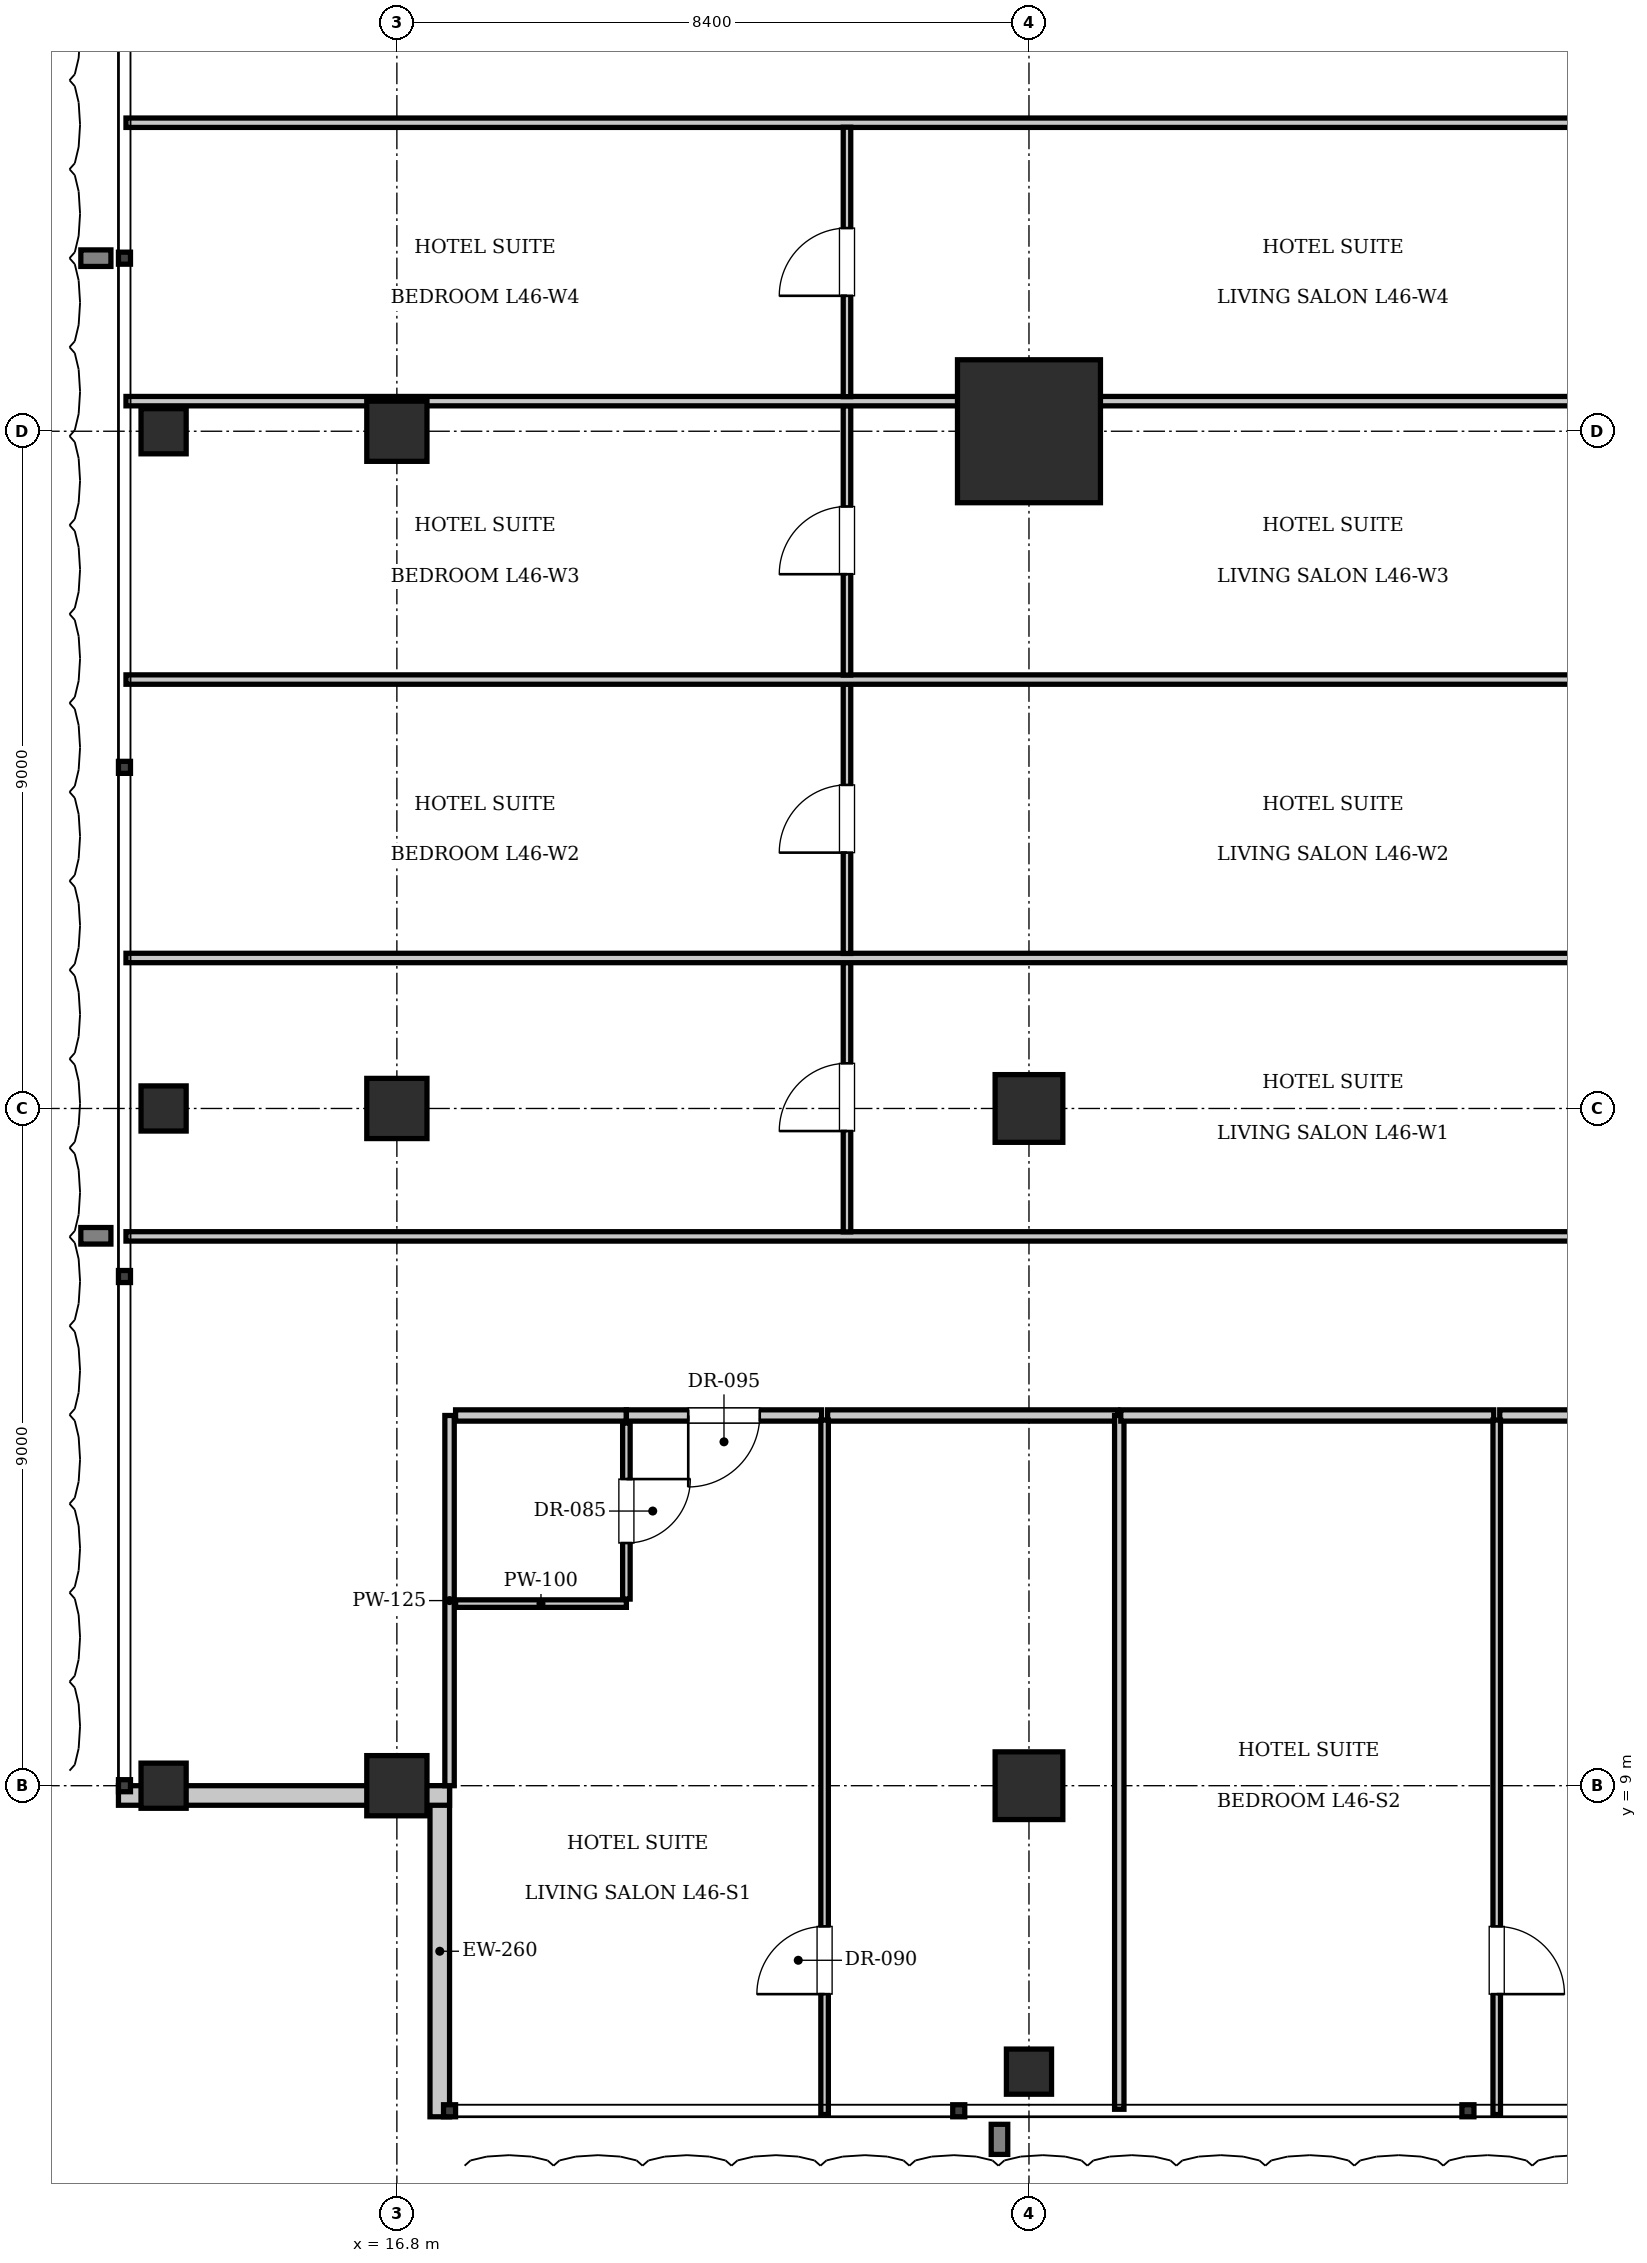
"""IFC4 building model, lengths in metres.
Left out: names, types, materials, properties, quantities, classifications, styles, units other than length and angle.
Written with IfcOpenShell. Run it as: python <this file> out.ifc"""

import sys

from ifc_helpers import new_model, si_unit, direction, frame, frame_2d, origin, origin_2d, place, context, subcontext, project, spatial, rectangle, i_section, extrude, element, fill, save


model = new_model("IFC4")
c1 = context("Model", 3, precision=1e-05, world=origin(), true_north=direction((0.0, 1.0)))
c2 = subcontext(c1, "Body", "Model", "MODEL_VIEW")
j1 = project(units=[si_unit("LENGTHUNIT", "METRE"), si_unit("PLANEANGLEUNIT", "RADIAN")], contexts=[c1])
p1 = place(None, origin())
s1 = spatial("IfcSite", under=j1, at=p1, CompositionType="ELEMENT")
p2 = place(p1, origin())
s2 = spatial("IfcBuilding", under=s1, at=p2, CompositionType="ELEMENT")
p3 = place(p2, frame((0.0, 0.0, 189.0)))
s3 = spatial("IfcBuildingStorey", under=s2, at=p3, CompositionType="ELEMENT", Elevation=189.0)
p4 = place(p3, frame((25.2, 27.0, 0.0), z_axis=(0.0, 0.0, 1.0), x_axis=(1.0, 0.0, 0.0)))
e1 = element("IfcColumn", 1, at=p4, inside=s3, PredefinedType="COLUMN", context=c2, shape_type="SweptSolid", body=[
    extrude(rectangle(XDim=1.9, YDim=1.9, at=origin_2d()), origin(), (0.0, 0.0, 1.0), 3.85),
])
for number, where, z_axis, x_axis in (
    (2, (25.2, 18.0, 0.0), (0.0, 0.0, 1.0), (1.0, 0.0, 0.0)),
    (3, (25.2, 9.0, 0.0), (0.0, 0.0, 1.0), (1.0, 0.0, 0.0)),
):
    element("IfcColumn", number, at=place(p3, frame(where, z_axis=z_axis, x_axis=x_axis)), inside=s3, PredefinedType="COLUMN", context=c2, shape_type="SweptSolid", body=[
        extrude(rectangle(XDim=0.9, YDim=0.9, at=origin_2d()), origin(), (0.0, 0.0, 1.0), 3.85),
    ])
for number, where, z_axis, x_axis in (
    (4, (16.8, 9.0, 0.0), (0.0, 0.0, 1.0), (1.0, 0.0, 0.0)),
    (5, (16.8, 18.0, 0.0), (0.0, 0.0, 1.0), (1.0, 0.0, 0.0)),
    (6, (16.8, 27.0, 0.0), (0.0, 0.0, 1.0), (1.0, 0.0, 0.0)),
):
    element("IfcColumn", number, at=place(p3, frame(where, z_axis=z_axis, x_axis=x_axis)), inside=s3, PredefinedType="COLUMN", context=c2, shape_type="SweptSolid", body=[
        extrude(rectangle(XDim=0.8, YDim=0.8, at=origin_2d()), origin(), (0.0, 0.0, 1.0), 3.85),
    ])
for number, where, z_axis, x_axis in (
    (7, (13.7, 9.0, 0.0), (0.0, 0.0, 1.0), (1.0, 0.0, 0.0)),
    (8, (13.7, 18.0, 0.0), (0.0, 0.0, 1.0), (1.0, 0.0, 0.0)),
    (9, (13.7, 27.0, 0.0), (0.0, 0.0, 1.0), (1.0, 0.0, 0.0)),
    (10, (25.2, 5.2, 0.0), (0.0, 0.0, 1.0), (1.0, 0.0, 0.0)),
):
    element("IfcColumn", number, at=place(p3, frame(where, z_axis=z_axis, x_axis=x_axis)), inside=s3, PredefinedType="COLUMN", context=c2, shape_type="SweptSolid", body=[
        extrude(i_section(OverallWidth=0.6, OverallDepth=0.6, WebThickness=0.025, FlangeThickness=0.038, at=origin_2d()), origin(), (0.0, 0.0, 1.0), 3.85),
    ])
p5 = place(p3, frame((17.37, 4.6, 0.0), z_axis=(0.0, 0.0, 1.0), x_axis=(0.0, 1.0, 0.0)))
e11 = element("IfcWall", 11, at=p5, inside=s3, PredefinedType="SOLIDWALL", context=c2, shape_type="SweptSolid", body=[
    extrude(rectangle(XDim=4.4, YDim=0.26, at=frame_2d((2.2, 0.0))), origin(), (0.0, 0.0, 1.0), 3.61),
])
p6 = place(p3, frame((17.5, 8.87, 0.0), z_axis=(0.0, 0.0, 1.0), x_axis=(-1.0, 0.0, 0.0)))
e12 = element("IfcWall", 12, at=p6, inside=s3, PredefinedType="SOLIDWALL", context=c2, shape_type="SweptSolid", body=[
    extrude(rectangle(XDim=4.4, YDim=0.26, at=frame_2d((2.2, 0.0))), origin(), (0.0, 0.0, 1.0), 3.007),
])
p7 = place(p3, frame((17.5, 9.0, 0.0), z_axis=(0.0, 0.0, 1.0), x_axis=(0.0, 1.0, 0.0)))
e13 = element("IfcWall", 13, at=p7, inside=s3, PredefinedType="PARTITIONING", context=c2, shape_type="SweptSolid", body=[
    extrude(rectangle(XDim=4.92, YDim=0.125, at=frame_2d((2.46, 0.0))), origin(), (0.0, 0.0, 1.0), 3.61),
])
p8 = place(p3, frame((17.58, 13.92, 0.0), z_axis=(0.0, 0.0, 1.0), x_axis=(1.0, 0.0, 0.0)))
e14 = element("IfcWall", 14, at=p8, inside=s3, PredefinedType="PARTITIONING", context=c2, shape_type="SweptSolid", body=[
    extrude(rectangle(XDim=2.27, YDim=0.15, at=frame_2d((1.135, 0.0))), origin(), (0.0, 0.0, 1.0), 3.61),
])
p9 = place(p3, frame((17.58, 11.42, 0.0), z_axis=(0.0, 0.0, 1.0), x_axis=(1.0, 0.0, 0.0)))
e15 = element("IfcWall", 15, at=p9, inside=s3, PredefinedType="PARTITIONING", context=c2, shape_type="SweptSolid", body=[
    extrude(rectangle(XDim=2.27, YDim=0.1, at=frame_2d((1.135, 0.0))), origin(), (0.0, 0.0, 1.0), 3.61),
])
p10 = place(p3, frame((19.85, 11.48, 0.0), z_axis=(0.0, 0.0, 1.0), x_axis=(0.0, 1.0, 0.0)))
e16 = element("IfcWall", 16, at=p10, inside=s3, PredefinedType="PARTITIONING", context=c2, shape_type="SweptSolid", body=[
    extrude(rectangle(XDim=2.34, YDim=0.1, at=frame_2d((1.17, 0.0))), origin(), (0.0, 0.0, 1.0), 3.61),
])
p11 = place(p10, frame((0.745, 0.0, 0.0)))
e17 = element("IfcOpeningElement", 17, at=p11, cuts=e16, PredefinedType="OPENING", context=c2, shape_type="SweptSolid", body=[
    extrude(rectangle(XDim=0.85, YDim=2.1, at=frame_2d((0.425, 1.05))), frame((0.0, 0.06, 0.0), z_axis=(0.0, -1.0, 0.0), x_axis=(1.0, 0.0, 0.0)), (0.0, 0.0, 1.0), 0.12),
])
p12 = place(p3, frame((19.85, 13.92, 0.0), z_axis=(0.0, 0.0, 1.0), x_axis=(1.0, 0.0, 0.0)))
e18 = element("IfcWall", 18, at=p12, inside=s3, PredefinedType="PARTITIONING", context=c2, shape_type="SweptSolid", body=[
    extrude(rectangle(XDim=2.594, YDim=0.15, at=frame_2d((1.297, 0.0))), origin(), (0.0, 0.0, 1.0), 3.61),
])
p13 = place(p12, frame((0.822, 0.0, 0.0)))
e19 = element("IfcOpeningElement", 19, at=p13, cuts=e18, PredefinedType="OPENING", context=c2, shape_type="SweptSolid", body=[
    extrude(rectangle(XDim=0.95, YDim=2.15, at=frame_2d((0.475, 1.075))), frame((0.0, 0.085, 0.0), z_axis=(0.0, -1.0, 0.0), x_axis=(1.0, 0.0, 0.0)), (0.0, 0.0, 1.0), 0.17),
])
p14 = place(p3, frame((22.524, 13.92, 0.0), z_axis=(0.0, 0.0, 1.0), x_axis=(1.0, 0.0, 0.0)))
e20 = element("IfcWall", 20, at=p14, inside=s3, PredefinedType="PARTITIONING", context=c2, shape_type="SweptSolid", body=[
    extrude(rectangle(XDim=3.856, YDim=0.15, at=frame_2d((1.928, 0.0))), origin(), (0.0, 0.0, 1.0), 3.61),
])
p15 = place(p3, frame((22.484, 4.63, 0.0), z_axis=(0.0, 0.0, 1.0), x_axis=(0.0, 1.0, 0.0)))
e21 = element("IfcWall", 21, at=p15, inside=s3, PredefinedType="PARTITIONING", context=c2, shape_type="SweptSolid", body=[
    extrude(rectangle(XDim=9.23, YDim=0.1, at=frame_2d((4.615, 0.0))), origin(), (0.0, 0.0, 1.0), 3.61),
])
p16 = place(p15, frame((1.6, 0.0, 0.0)))
e22 = element("IfcOpeningElement", 22, at=p16, cuts=e21, PredefinedType="OPENING", context=c2, shape_type="SweptSolid", body=[
    extrude(rectangle(XDim=0.9, YDim=2.1, at=frame_2d((0.45, 1.05))), frame((0.0, 0.06, 0.0), z_axis=(0.0, -1.0, 0.0), x_axis=(1.0, 0.0, 0.0)), (0.0, 0.0, 1.0), 0.12),
])
p17 = place(p3, frame((26.4, 4.7, 0.0), z_axis=(0.0, 0.0, 1.0), x_axis=(0.0, 1.0, 0.0)))
e23 = element("IfcWall", 23, at=p17, inside=s3, PredefinedType="PARTITIONING", context=c2, shape_type="SweptSolid", body=[
    extrude(rectangle(XDim=9.22, YDim=0.125, at=frame_2d((4.61, 0.0))), origin(), (0.0, 0.0, 1.0), 3.61),
])
p18 = place(p3, frame((26.42, 13.92, 0.0), z_axis=(0.0, 0.0, 1.0), x_axis=(1.0, 0.0, 0.0)))
e24 = element("IfcWall", 24, at=p18, inside=s3, PredefinedType="PARTITIONING", context=c2, shape_type="SweptSolid", body=[
    extrude(rectangle(XDim=4.956, YDim=0.15, at=frame_2d((2.478, 0.0))), origin(), (0.0, 0.0, 1.0), 3.61),
])
p19 = place(p3, frame((31.456, 13.92, 0.0), z_axis=(0.0, 0.0, 1.0), x_axis=(1.0, 0.0, 0.0)))
e25 = element("IfcWall", 25, at=p19, inside=s3, PredefinedType="PARTITIONING", context=c2, shape_type="SweptSolid", body=[
    extrude(rectangle(XDim=3.994, YDim=0.15, at=frame_2d((1.997, 0.0))), origin(), (0.0, 0.0, 1.0), 3.61),
])
p20 = place(p19, frame((1.522, 0.0, 0.0)))
e26 = element("IfcOpeningElement", 26, at=p20, cuts=e25, PredefinedType="OPENING", context=c2, shape_type="SweptSolid", body=[
    extrude(rectangle(XDim=0.95, YDim=2.15, at=frame_2d((0.475, 1.075))), frame((0.0, 0.085, 0.0), z_axis=(0.0, -1.0, 0.0), x_axis=(1.0, 0.0, 0.0)), (0.0, 0.0, 1.0), 0.17),
])
p21 = place(p3, frame((31.416, 4.63, 0.0), z_axis=(0.0, 0.0, 1.0), x_axis=(0.0, 1.0, 0.0)))
e27 = element("IfcWall", 27, at=p21, inside=s3, PredefinedType="PARTITIONING", context=c2, shape_type="SweptSolid", body=[
    extrude(rectangle(XDim=9.23, YDim=0.1, at=frame_2d((4.615, 0.0))), origin(), (0.0, 0.0, 1.0), 3.61),
])
p22 = place(p21, frame((1.6, 0.0, 0.0)))
e28 = element("IfcOpeningElement", 28, at=p22, cuts=e27, PredefinedType="OPENING", context=c2, shape_type="SweptSolid", body=[
    extrude(rectangle(XDim=0.9, YDim=2.1, at=frame_2d((0.45, 1.05))), frame((0.0, 0.06, 0.0), z_axis=(0.0, -1.0, 0.0), x_axis=(1.0, 0.0, 0.0)), (0.0, 0.0, 1.0), 0.12),
])
for number, where, z_axis, x_axis in (
    (29, (13.2, 16.3, 0.0), (0.0, 0.0, 1.0), (1.0, 0.0, 0.0)),
    (30, (13.2, 31.1, 0.0), (0.0, 0.0, 1.0), (1.0, 0.0, 0.0)),
):
    element("IfcWall", number, at=place(p3, frame(where, z_axis=z_axis, x_axis=x_axis)), inside=s3, PredefinedType="PARTITIONING", context=c2, shape_type="SweptSolid", body=[
        extrude(rectangle(XDim=22.52, YDim=0.125, at=frame_2d((11.26, 0.0))), origin(), (0.0, 0.0, 1.0), 3.61),
    ])
p23 = place(p3, frame((22.781, 16.36, 0.0), z_axis=(0.0, 0.0, 1.0), x_axis=(0.0, 1.0, 0.0)))
e31 = element("IfcWall", 31, at=p23, inside=s3, PredefinedType="PARTITIONING", context=c2, shape_type="SweptSolid", body=[
    extrude(rectangle(XDim=3.58, YDim=0.1, at=frame_2d((1.79, 0.0))), origin(), (0.0, 0.0, 1.0), 3.61),
])
p24 = place(p23, frame((1.34, 0.0, 0.0)))
e32 = element("IfcOpeningElement", 32, at=p24, cuts=e31, PredefinedType="OPENING", context=c2, shape_type="SweptSolid", body=[
    extrude(rectangle(XDim=0.9, YDim=2.1, at=frame_2d((0.45, 1.05))), frame((0.0, 0.06, 0.0), z_axis=(0.0, -1.0, 0.0), x_axis=(1.0, 0.0, 0.0)), (0.0, 0.0, 1.0), 0.12),
])
p25 = place(p3, frame((13.2, 20.0, 0.0), z_axis=(0.0, 0.0, 1.0), x_axis=(1.0, 0.0, 0.0)))
e33 = element("IfcWall", 33, at=p25, inside=s3, PredefinedType="PARTITIONING", context=c2, shape_type="SweptSolid", body=[
    extrude(rectangle(XDim=22.52, YDim=0.125, at=frame_2d((11.26, 0.0))), origin(), (0.0, 0.0, 1.0), 3.61),
])
p26 = place(p3, frame((22.781, 20.06, 0.0), z_axis=(0.0, 0.0, 1.0), x_axis=(0.0, 1.0, 0.0)))
e34 = element("IfcWall", 34, at=p26, inside=s3, PredefinedType="PARTITIONING", context=c2, shape_type="SweptSolid", body=[
    extrude(rectangle(XDim=3.58, YDim=0.1, at=frame_2d((1.79, 0.0))), origin(), (0.0, 0.0, 1.0), 3.61),
])
p27 = place(p26, frame((1.34, 0.0, 0.0)))
e35 = element("IfcOpeningElement", 35, at=p27, cuts=e34, PredefinedType="OPENING", context=c2, shape_type="SweptSolid", body=[
    extrude(rectangle(XDim=0.9, YDim=2.1, at=frame_2d((0.45, 1.05))), frame((0.0, 0.06, 0.0), z_axis=(0.0, -1.0, 0.0), x_axis=(1.0, 0.0, 0.0)), (0.0, 0.0, 1.0), 0.12),
])
p28 = place(p3, frame((13.2, 23.7, 0.0), z_axis=(0.0, 0.0, 1.0), x_axis=(1.0, 0.0, 0.0)))
e36 = element("IfcWall", 36, at=p28, inside=s3, PredefinedType="PARTITIONING", context=c2, shape_type="SweptSolid", body=[
    extrude(rectangle(XDim=22.52, YDim=0.125, at=frame_2d((11.26, 0.0))), origin(), (0.0, 0.0, 1.0), 3.61),
])
p29 = place(p3, frame((22.781, 23.76, 0.0), z_axis=(0.0, 0.0, 1.0), x_axis=(0.0, 1.0, 0.0)))
e37 = element("IfcWall", 37, at=p29, inside=s3, PredefinedType="PARTITIONING", context=c2, shape_type="SweptSolid", body=[
    extrude(rectangle(XDim=3.58, YDim=0.1, at=frame_2d((1.79, 0.0))), origin(), (0.0, 0.0, 1.0), 3.61),
])
p30 = place(p29, frame((1.34, 0.0, 0.0)))
e38 = element("IfcOpeningElement", 38, at=p30, cuts=e37, PredefinedType="OPENING", context=c2, shape_type="SweptSolid", body=[
    extrude(rectangle(XDim=0.9, YDim=2.1, at=frame_2d((0.45, 1.05))), frame((0.0, 0.06, 0.0), z_axis=(0.0, -1.0, 0.0), x_axis=(1.0, 0.0, 0.0)), (0.0, 0.0, 1.0), 0.12),
])
p31 = place(p3, frame((13.2, 27.4, 0.0), z_axis=(0.0, 0.0, 1.0), x_axis=(1.0, 0.0, 0.0)))
e39 = element("IfcWall", 39, at=p31, inside=s3, PredefinedType="PARTITIONING", context=c2, shape_type="SweptSolid", body=[
    extrude(rectangle(XDim=22.52, YDim=0.125, at=frame_2d((11.26, 0.0))), origin(), (0.0, 0.0, 1.0), 3.61),
])
p32 = place(p3, frame((22.781, 27.46, 0.0), z_axis=(0.0, 0.0, 1.0), x_axis=(0.0, 1.0, 0.0)))
e40 = element("IfcWall", 40, at=p32, inside=s3, PredefinedType="PARTITIONING", context=c2, shape_type="SweptSolid", body=[
    extrude(rectangle(XDim=3.58, YDim=0.1, at=frame_2d((1.79, 0.0))), origin(), (0.0, 0.0, 1.0), 3.61),
])
p33 = place(p32, frame((1.34, 0.0, 0.0)))
e41 = element("IfcOpeningElement", 41, at=p33, cuts=e40, PredefinedType="OPENING", context=c2, shape_type="SweptSolid", body=[
    extrude(rectangle(XDim=0.9, YDim=2.1, at=frame_2d((0.45, 1.05))), frame((0.0, 0.06, 0.0), z_axis=(0.0, -1.0, 0.0), x_axis=(1.0, 0.0, 0.0)), (0.0, 0.0, 1.0), 0.12),
])
p34 = place(p11, frame((0.85, 0.0, 0.0), z_axis=(0.0, 0.0, 1.0), x_axis=(-1.0, 0.0, 0.0)))
e42 = element("IfcDoor", 42, at=p34, inside=s3, OperationType="SINGLE_SWING_LEFT", PredefinedType="DOOR", context=c2, shape_type="SweptSolid", body=[
    extrude(rectangle(XDim=0.85, YDim=2.1, at=frame_2d((0.425, 1.05))), frame((0.0, 0.025, 0.0), z_axis=(0.0, -1.0, 0.0), x_axis=(1.0, 0.0, 0.0)), (0.0, 0.0, 1.0), 0.05),
])
fill(e17, e42)
p35 = place(p13, frame((0.95, 0.0, 0.0), z_axis=(0.0, 0.0, 1.0), x_axis=(-1.0, 0.0, 0.0)))
e43 = element("IfcDoor", 43, at=p35, inside=s3, OperationType="SINGLE_SWING_RIGHT", PredefinedType="DOOR", context=c2, shape_type="SweptSolid", body=[
    extrude(rectangle(XDim=0.95, YDim=2.15, at=frame_2d((0.475, 1.075))), frame((0.0, 0.025, 0.0), z_axis=(0.0, -1.0, 0.0), x_axis=(1.0, 0.0, 0.0)), (0.0, 0.0, 1.0), 0.05),
])
fill(e19, e43)
p36 = place(p16, origin())
e44 = element("IfcDoor", 44, at=p36, inside=s3, OperationType="SINGLE_SWING_LEFT", PredefinedType="DOOR", context=c2, shape_type="SweptSolid", body=[
    extrude(rectangle(XDim=0.9, YDim=2.1, at=frame_2d((0.45, 1.05))), frame((0.0, 0.025, 0.0), z_axis=(0.0, -1.0, 0.0), x_axis=(1.0, 0.0, 0.0)), (0.0, 0.0, 1.0), 0.05),
])
fill(e22, e44)
p37 = place(p22, frame((0.9, 0.0, 0.0), z_axis=(0.0, 0.0, 1.0), x_axis=(-1.0, 0.0, 0.0)))
e45 = element("IfcDoor", 45, at=p37, inside=s3, OperationType="SINGLE_SWING_RIGHT", PredefinedType="DOOR", context=c2, shape_type="SweptSolid", body=[
    extrude(rectangle(XDim=0.9, YDim=2.1, at=frame_2d((0.45, 1.05))), frame((0.0, 0.025, 0.0), z_axis=(0.0, -1.0, 0.0), x_axis=(1.0, 0.0, 0.0)), (0.0, 0.0, 1.0), 0.05),
])
fill(e28, e45)
p38 = place(p24, origin())
e46 = element("IfcDoor", 46, at=p38, inside=s3, OperationType="SINGLE_SWING_LEFT", PredefinedType="DOOR", context=c2, shape_type="SweptSolid", body=[
    extrude(rectangle(XDim=0.9, YDim=2.1, at=frame_2d((0.45, 1.05))), frame((0.0, 0.025, 0.0), z_axis=(0.0, -1.0, 0.0), x_axis=(1.0, 0.0, 0.0)), (0.0, 0.0, 1.0), 0.05),
])
fill(e32, e46)
p39 = place(p27, origin())
e47 = element("IfcDoor", 47, at=p39, inside=s3, OperationType="SINGLE_SWING_LEFT", PredefinedType="DOOR", context=c2, shape_type="SweptSolid", body=[
    extrude(rectangle(XDim=0.9, YDim=2.1, at=frame_2d((0.45, 1.05))), frame((0.0, 0.025, 0.0), z_axis=(0.0, -1.0, 0.0), x_axis=(1.0, 0.0, 0.0)), (0.0, 0.0, 1.0), 0.05),
])
fill(e35, e47)
p40 = place(p30, origin())
e48 = element("IfcDoor", 48, at=p40, inside=s3, OperationType="SINGLE_SWING_LEFT", PredefinedType="DOOR", context=c2, shape_type="SweptSolid", body=[
    extrude(rectangle(XDim=0.9, YDim=2.1, at=frame_2d((0.45, 1.05))), frame((0.0, 0.025, 0.0), z_axis=(0.0, -1.0, 0.0), x_axis=(1.0, 0.0, 0.0)), (0.0, 0.0, 1.0), 0.05),
])
fill(e38, e48)
p41 = place(p33, origin())
e49 = element("IfcDoor", 49, at=p41, inside=s3, OperationType="SINGLE_SWING_LEFT", PredefinedType="DOOR", context=c2, shape_type="SweptSolid", body=[
    extrude(rectangle(XDim=0.9, YDim=2.1, at=frame_2d((0.45, 1.05))), frame((0.0, 0.025, 0.0), z_axis=(0.0, -1.0, 0.0), x_axis=(1.0, 0.0, 0.0)), (0.0, 0.0, 1.0), 0.05),
])
fill(e41, e49)
save(model, sys.argv[1])
